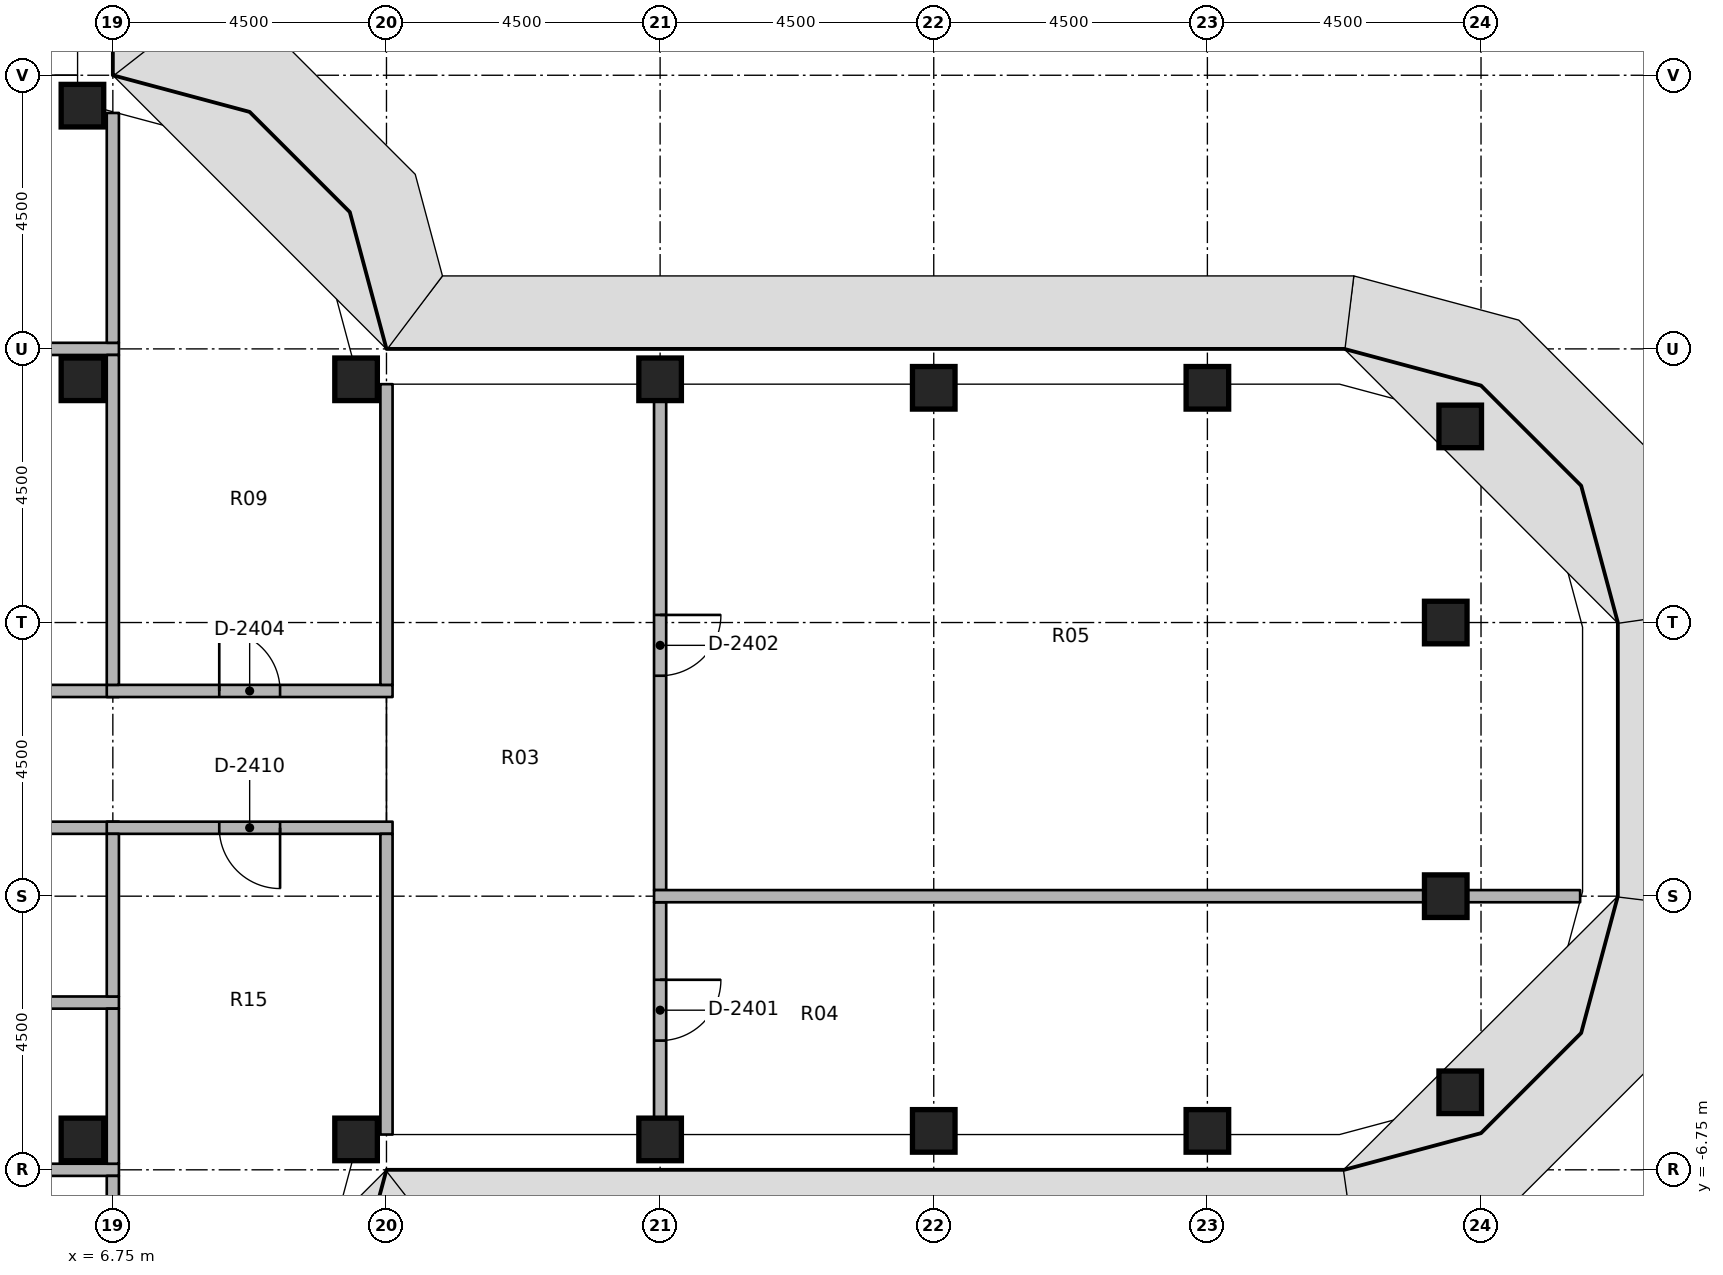
"""IFC4 building model, lengths in metres.
Left out: names, types, materials, properties, quantities, classifications, styles, units other than length and angle.
Written with IfcOpenShell. Run it as: python <this file> out.ifc"""

import sys

from ifc_helpers import new_model, si_unit, direction, frame, frame_2d, origin, origin_2d, place, context, subcontext, project, spatial, rectangle, extrude, element, fill, save


model = new_model("IFC4")
c1 = context("Model", 3, precision=1e-05, world=origin(), true_north=direction((0.0, 1.0)))
c2 = subcontext(c1, "Body", "Model", "MODEL_VIEW")
j1 = project(units=[si_unit("LENGTHUNIT", "METRE"), si_unit("PLANEANGLEUNIT", "RADIAN")], contexts=[c1])
p1 = place(None, origin())
s1 = spatial("IfcSite", under=j1, at=p1, CompositionType="ELEMENT")
p2 = place(p1, origin())
s2 = spatial("IfcBuilding", under=s1, at=p2, CompositionType="ELEMENT")
p3 = place(p2, frame((0.0, 0.0, 222.0)))
s3 = spatial("IfcBuildingStorey", under=s2, at=p3, CompositionType="ELEMENT", Elevation=222.0)
for number, where, z_axis, x_axis in (
    (1, (6.25, -6.25, 0.0), (0.0, 0.0, 1.0), (1.0, 0.0, 0.0)),
    (2, (6.25, 6.25, 0.0), (0.0, 0.0, 1.0), (1.0, 0.0, 0.0)),
    (3, (6.25, 10.75, 0.0), (0.0, 0.0, 1.0), (1.0, 0.0, 0.0)),
    (4, (10.75, -6.25, 0.0), (0.0, 0.0, 1.0), (1.0, 0.0, 0.0)),
    (5, (10.75, 6.25, 0.0), (0.0, 0.0, 1.0), (1.0, 0.0, 0.0)),
    (6, (15.75, -6.25, 0.0), (0.0, 0.0, 1.0), (1.0, 0.0, 0.0)),
    (7, (15.75, 6.25, 0.0), (0.0, 0.0, 1.0), (1.0, 0.0, 0.0)),
    (8, (20.25, -6.11, 0.0), (0.0, 0.0, 1.0), (1.0, 0.0, 0.0)),
    (9, (20.25, 6.11, 0.0), (0.0, 0.0, 1.0), (1.0, 0.0, 0.0)),
    (10, (24.75, -6.11, 0.0), (0.0, 0.0, 1.0), (1.0, 0.0, 0.0)),
    (11, (24.75, 6.11, 0.0), (0.0, 0.0, 1.0), (1.0, 0.0, 0.0)),
    (12, (28.908, -5.475, 0.0), (0.0, 0.0, 1.0), (1.0, 0.0, 0.0)),
    (13, (28.67, -2.25, 0.0), (0.0, 0.0, 1.0), (1.0, 0.0, 0.0)),
    (14, (28.67, 2.25, 0.0), (0.0, 0.0, 1.0), (1.0, 0.0, 0.0)),
    (15, (28.908, 5.475, 0.0), (0.0, 0.0, 1.0), (1.0, 0.0, 0.0)),
):
    element("IfcColumn", number, at=place(p3, frame(where, z_axis=z_axis, x_axis=x_axis)), inside=s3, PredefinedType="COLUMN", context=c2, shape_type="SweptSolid", body=[
        extrude(rectangle(XDim=0.7, YDim=0.7, at=origin_2d()), origin(), (0.0, 0.0, 1.0), 3.65),
    ])
p4 = place(p3, frame((1.025, 1.125, 0.0), z_axis=(0.0, 0.0, 1.0), x_axis=(1.0, 0.0, 0.0)))
e16 = element("IfcWall", 16, at=p4, inside=s3, PredefinedType="PARTITIONING", context=c2, shape_type="SweptSolid", body=[
    extrude(rectangle(XDim=5.825, YDim=0.2, at=frame_2d((2.913, 0.0))), origin(), (0.0, 0.0, 1.0), 2.75),
])
p5 = place(p4, frame((2.413, 0.0, 0.0)))
e17 = element("IfcOpeningElement", 17, at=p5, cuts=e16, PredefinedType="OPENING", context=c2, shape_type="SweptSolid", body=[
    extrude(rectangle(XDim=1.0, YDim=2.1, at=frame_2d((0.5, 1.05))), frame((0.0, 0.11, 0.0), z_axis=(0.0, -1.0, 0.0), x_axis=(1.0, 0.0, 0.0)), (0.0, 0.0, 1.0), 0.22),
])
p6 = place(p3, frame((6.65, 1.125, 0.0), z_axis=(0.0, 0.0, 1.0), x_axis=(1.0, 0.0, 0.0)))
e18 = element("IfcWall", 18, at=p6, inside=s3, PredefinedType="PARTITIONING", context=c2, shape_type="SweptSolid", body=[
    extrude(rectangle(XDim=4.7, YDim=0.2, at=frame_2d((2.35, 0.0))), origin(), (0.0, 0.0, 1.0), 2.75),
])
p7 = place(p6, frame((1.85, 0.0, 0.0)))
e19 = element("IfcOpeningElement", 19, at=p7, cuts=e18, PredefinedType="OPENING", context=c2, shape_type="SweptSolid", body=[
    extrude(rectangle(XDim=1.0, YDim=2.1, at=frame_2d((0.5, 1.05))), frame((0.0, 0.11, 0.0), z_axis=(0.0, -1.0, 0.0), x_axis=(1.0, 0.0, 0.0)), (0.0, 0.0, 1.0), 0.22),
])
p8 = place(p3, frame((6.85, -1.125, 0.0), z_axis=(0.0, 0.0, 1.0), x_axis=(-1.0, 0.0, 0.0)))
e20 = element("IfcWall", 20, at=p8, inside=s3, PredefinedType="PARTITIONING", context=c2, shape_type="SweptSolid", body=[
    extrude(rectangle(XDim=5.825, YDim=0.2, at=frame_2d((2.913, 0.0))), origin(), (0.0, 0.0, 1.0), 2.75),
])
p9 = place(p8, frame((2.462, 0.0, 0.0)))
e21 = element("IfcOpeningElement", 21, at=p9, cuts=e20, PredefinedType="OPENING", context=c2, shape_type="SweptSolid", body=[
    extrude(rectangle(XDim=0.9, YDim=2.1, at=frame_2d((0.45, 1.05))), frame((0.0, 0.11, 0.0), z_axis=(0.0, -1.0, 0.0), x_axis=(1.0, 0.0, 0.0)), (0.0, 0.0, 1.0), 0.22),
])
p10 = place(p3, frame((11.35, -1.125, 0.0), z_axis=(0.0, 0.0, 1.0), x_axis=(-1.0, 0.0, 0.0)))
e22 = element("IfcWall", 22, at=p10, inside=s3, PredefinedType="PARTITIONING", context=c2, shape_type="SweptSolid", body=[
    extrude(rectangle(XDim=4.7, YDim=0.2, at=frame_2d((2.35, 0.0))), origin(), (0.0, 0.0, 1.0), 2.75),
])
p11 = place(p10, frame((1.85, 0.0, 0.0)))
e23 = element("IfcOpeningElement", 23, at=p11, cuts=e22, PredefinedType="OPENING", context=c2, shape_type="SweptSolid", body=[
    extrude(rectangle(XDim=1.0, YDim=2.1, at=frame_2d((0.5, 1.05))), frame((0.0, 0.11, 0.0), z_axis=(0.0, -1.0, 0.0), x_axis=(1.0, 0.0, 0.0)), (0.0, 0.0, 1.0), 0.22),
])
p12 = place(p3, frame((1.025, 6.75, 0.0), z_axis=(0.0, 0.0, 1.0), x_axis=(1.0, 0.0, 0.0)))
e24 = element("IfcWall", 24, at=p12, inside=s3, PredefinedType="PARTITIONING", context=c2, shape_type="SweptSolid", body=[
    extrude(rectangle(XDim=5.825, YDim=0.2, at=frame_2d((2.913, 0.0))), origin(), (0.0, 0.0, 1.0), 2.75),
])
p13 = place(p3, frame((6.75, 6.85, 0.0), z_axis=(0.0, 0.0, 1.0), x_axis=(0.0, 1.0, 0.0)))
e25 = element("IfcWall", 25, at=p13, inside=s3, PredefinedType="PARTITIONING", context=c2, shape_type="SweptSolid", body=[
    extrude(rectangle(XDim=3.78, YDim=0.2, at=frame_2d((1.89, 0.0))), origin(), (0.0, 0.0, 1.0), 2.75),
])
p14 = place(p3, frame((1.025, -6.75, 0.0), z_axis=(0.0, 0.0, 1.0), x_axis=(1.0, 0.0, 0.0)))
e26 = element("IfcWall", 26, at=p14, inside=s3, PredefinedType="PARTITIONING", context=c2, shape_type="SweptSolid", body=[
    extrude(rectangle(XDim=5.825, YDim=0.2, at=frame_2d((2.913, 0.0))), origin(), (0.0, 0.0, 1.0), 2.75),
])
p15 = place(p3, frame((6.75, -10.63, 0.0), z_axis=(0.0, 0.0, 1.0), x_axis=(0.0, 1.0, 0.0)))
e27 = element("IfcWall", 27, at=p15, inside=s3, PredefinedType="PARTITIONING", context=c2, shape_type="SweptSolid", body=[
    extrude(rectangle(XDim=3.78, YDim=0.2, at=frame_2d((1.89, 0.0))), origin(), (0.0, 0.0, 1.0), 2.75),
])
p16 = place(p3, frame((6.75, 1.225, 0.0), z_axis=(0.0, 0.0, 1.0), x_axis=(0.0, 1.0, 0.0)))
e28 = element("IfcWall", 28, at=p16, inside=s3, PredefinedType="PARTITIONING", context=c2, shape_type="SweptSolid", body=[
    extrude(rectangle(XDim=5.425, YDim=0.2, at=frame_2d((2.712, 0.0))), origin(), (0.0, 0.0, 1.0), 2.75),
])
p17 = place(p3, frame((11.25, 1.225, 0.0), z_axis=(0.0, 0.0, 1.0), x_axis=(0.0, 1.0, 0.0)))
e29 = element("IfcWall", 29, at=p17, inside=s3, PredefinedType="PARTITIONING", context=c2, shape_type="SweptSolid", body=[
    extrude(rectangle(XDim=4.945, YDim=0.2, at=frame_2d((2.472, 0.0))), origin(), (0.0, 0.0, 1.0), 2.75),
])
p18 = place(p3, frame((1.025, -4.0, 0.0), z_axis=(0.0, 0.0, 1.0), x_axis=(1.0, 0.0, 0.0)))
e30 = element("IfcWall", 30, at=p18, inside=s3, PredefinedType="PARTITIONING", context=c2, shape_type="SweptSolid", body=[
    extrude(rectangle(XDim=5.825, YDim=0.2, at=frame_2d((2.913, 0.0))), origin(), (0.0, 0.0, 1.0), 2.75),
])
p19 = place(p3, frame((6.75, -3.9, 0.0), z_axis=(0.0, 0.0, 1.0), x_axis=(0.0, 1.0, 0.0)))
e31 = element("IfcWall", 31, at=p19, inside=s3, PredefinedType="PARTITIONING", context=c2, shape_type="SweptSolid", body=[
    extrude(rectangle(XDim=2.675, YDim=0.2, at=frame_2d((1.337, 0.0))), origin(), (0.0, 0.0, 1.0), 2.75),
])
p20 = place(p3, frame((6.75, -6.65, 0.0), z_axis=(0.0, 0.0, 1.0), x_axis=(0.0, 1.0, 0.0)))
e32 = element("IfcWall", 32, at=p20, inside=s3, PredefinedType="PARTITIONING", context=c2, shape_type="SweptSolid", body=[
    extrude(rectangle(XDim=2.55, YDim=0.2, at=frame_2d((1.275, 0.0))), origin(), (0.0, 0.0, 1.0), 2.75),
])
p21 = place(p3, frame((11.25, -6.17, 0.0), z_axis=(0.0, 0.0, 1.0), x_axis=(0.0, 1.0, 0.0)))
e33 = element("IfcWall", 33, at=p21, inside=s3, PredefinedType="PARTITIONING", context=c2, shape_type="SweptSolid", body=[
    extrude(rectangle(XDim=4.945, YDim=0.2, at=frame_2d((2.472, 0.0))), origin(), (0.0, 0.0, 1.0), 2.75),
])
p22 = place(p3, frame((15.75, -2.35, 0.0), z_axis=(0.0, 0.0, 1.0), x_axis=(0.0, -1.0, 0.0)))
e34 = element("IfcWall", 34, at=p22, inside=s3, PredefinedType="PARTITIONING", context=c2, shape_type="SweptSolid", body=[
    extrude(rectangle(XDim=3.55, YDim=0.2, at=frame_2d((1.775, 0.0))), origin(), (0.0, 0.0, 1.0), 2.75),
])
p23 = place(p22, frame((1.275, 0.0, 0.0)))
e35 = element("IfcOpeningElement", 35, at=p23, cuts=e34, PredefinedType="OPENING", context=c2, shape_type="SweptSolid", body=[
    extrude(rectangle(XDim=1.0, YDim=2.1, at=frame_2d((0.5, 1.05))), frame((0.0, 0.11, 0.0), z_axis=(0.0, -1.0, 0.0), x_axis=(1.0, 0.0, 0.0)), (0.0, 0.0, 1.0), 0.22),
])
p24 = place(p3, frame((15.75, 5.9, 0.0), z_axis=(0.0, 0.0, 1.0), x_axis=(0.0, -1.0, 0.0)))
e36 = element("IfcWall", 36, at=p24, inside=s3, PredefinedType="PARTITIONING", context=c2, shape_type="SweptSolid", body=[
    extrude(rectangle(XDim=8.05, YDim=0.2, at=frame_2d((4.025, 0.0))), origin(), (0.0, 0.0, 1.0), 2.75),
])
p25 = place(p24, frame((3.525, 0.0, 0.0)))
e37 = element("IfcOpeningElement", 37, at=p25, cuts=e36, PredefinedType="OPENING", context=c2, shape_type="SweptSolid", body=[
    extrude(rectangle(XDim=1.0, YDim=2.1, at=frame_2d((0.5, 1.05))), frame((0.0, 0.11, 0.0), z_axis=(0.0, -1.0, 0.0), x_axis=(1.0, 0.0, 0.0)), (0.0, 0.0, 1.0), 0.22),
])
p26 = place(p3, frame((15.65, -2.25, 0.0), z_axis=(0.0, 0.0, 1.0), x_axis=(1.0, 0.0, 0.0)))
e38 = element("IfcWall", 38, at=p26, inside=s3, PredefinedType="PARTITIONING", context=c2, shape_type="SweptSolid", body=[
    extrude(rectangle(XDim=12.67, YDim=0.2, at=frame_2d((6.335, 0.0))), origin(), (0.0, 0.0, 1.0), 2.75),
])
p27 = place(p3, frame((29.02, -2.25, 0.0), z_axis=(0.0, 0.0, 1.0), x_axis=(1.0, 0.0, 0.0)))
e39 = element("IfcWall", 39, at=p27, inside=s3, PredefinedType="PARTITIONING", context=c2, shape_type="SweptSolid", body=[
    extrude(rectangle(XDim=1.86, YDim=0.2, at=frame_2d((0.93, 0.0))), origin(), (0.0, 0.0, 1.0), 2.75),
])
p28 = place(p23, origin())
e40 = element("IfcDoor", 40, at=p28, inside=s3, OperationType="SINGLE_SWING_LEFT", PredefinedType="DOOR", context=c2, shape_type="SweptSolid", body=[
    extrude(rectangle(XDim=1.0, YDim=2.1, at=frame_2d((0.5, 1.05))), frame((0.0, 0.025, 0.0), z_axis=(0.0, -1.0, 0.0), x_axis=(1.0, 0.0, 0.0)), (0.0, 0.0, 1.0), 0.05),
])
fill(e35, e40)
p29 = place(p25, origin())
e41 = element("IfcDoor", 41, at=p29, inside=s3, OperationType="SINGLE_SWING_RIGHT", PredefinedType="DOOR", context=c2, shape_type="SweptSolid", body=[
    extrude(rectangle(XDim=1.0, YDim=2.1, at=frame_2d((0.5, 1.05))), frame((0.0, 0.025, 0.0), z_axis=(0.0, -1.0, 0.0), x_axis=(1.0, 0.0, 0.0)), (0.0, 0.0, 1.0), 0.05),
])
fill(e37, e41)
p30 = place(p7, origin())
e42 = element("IfcDoor", 42, at=p30, inside=s3, OperationType="SINGLE_SWING_RIGHT", PredefinedType="DOOR", context=c2, shape_type="SweptSolid", body=[
    extrude(rectangle(XDim=1.0, YDim=2.1, at=frame_2d((0.5, 1.05))), frame((0.0, 0.025, 0.0), z_axis=(0.0, -1.0, 0.0), x_axis=(1.0, 0.0, 0.0)), (0.0, 0.0, 1.0), 0.05),
])
fill(e19, e42)
p31 = place(p11, origin())
e43 = element("IfcDoor", 43, at=p31, inside=s3, OperationType="SINGLE_SWING_RIGHT", PredefinedType="DOOR", context=c2, shape_type="SweptSolid", body=[
    extrude(rectangle(XDim=1.0, YDim=2.1, at=frame_2d((0.5, 1.05))), frame((0.0, 0.025, 0.0), z_axis=(0.0, -1.0, 0.0), x_axis=(1.0, 0.0, 0.0)), (0.0, 0.0, 1.0), 0.05),
])
fill(e23, e43)
save(model, sys.argv[1])
